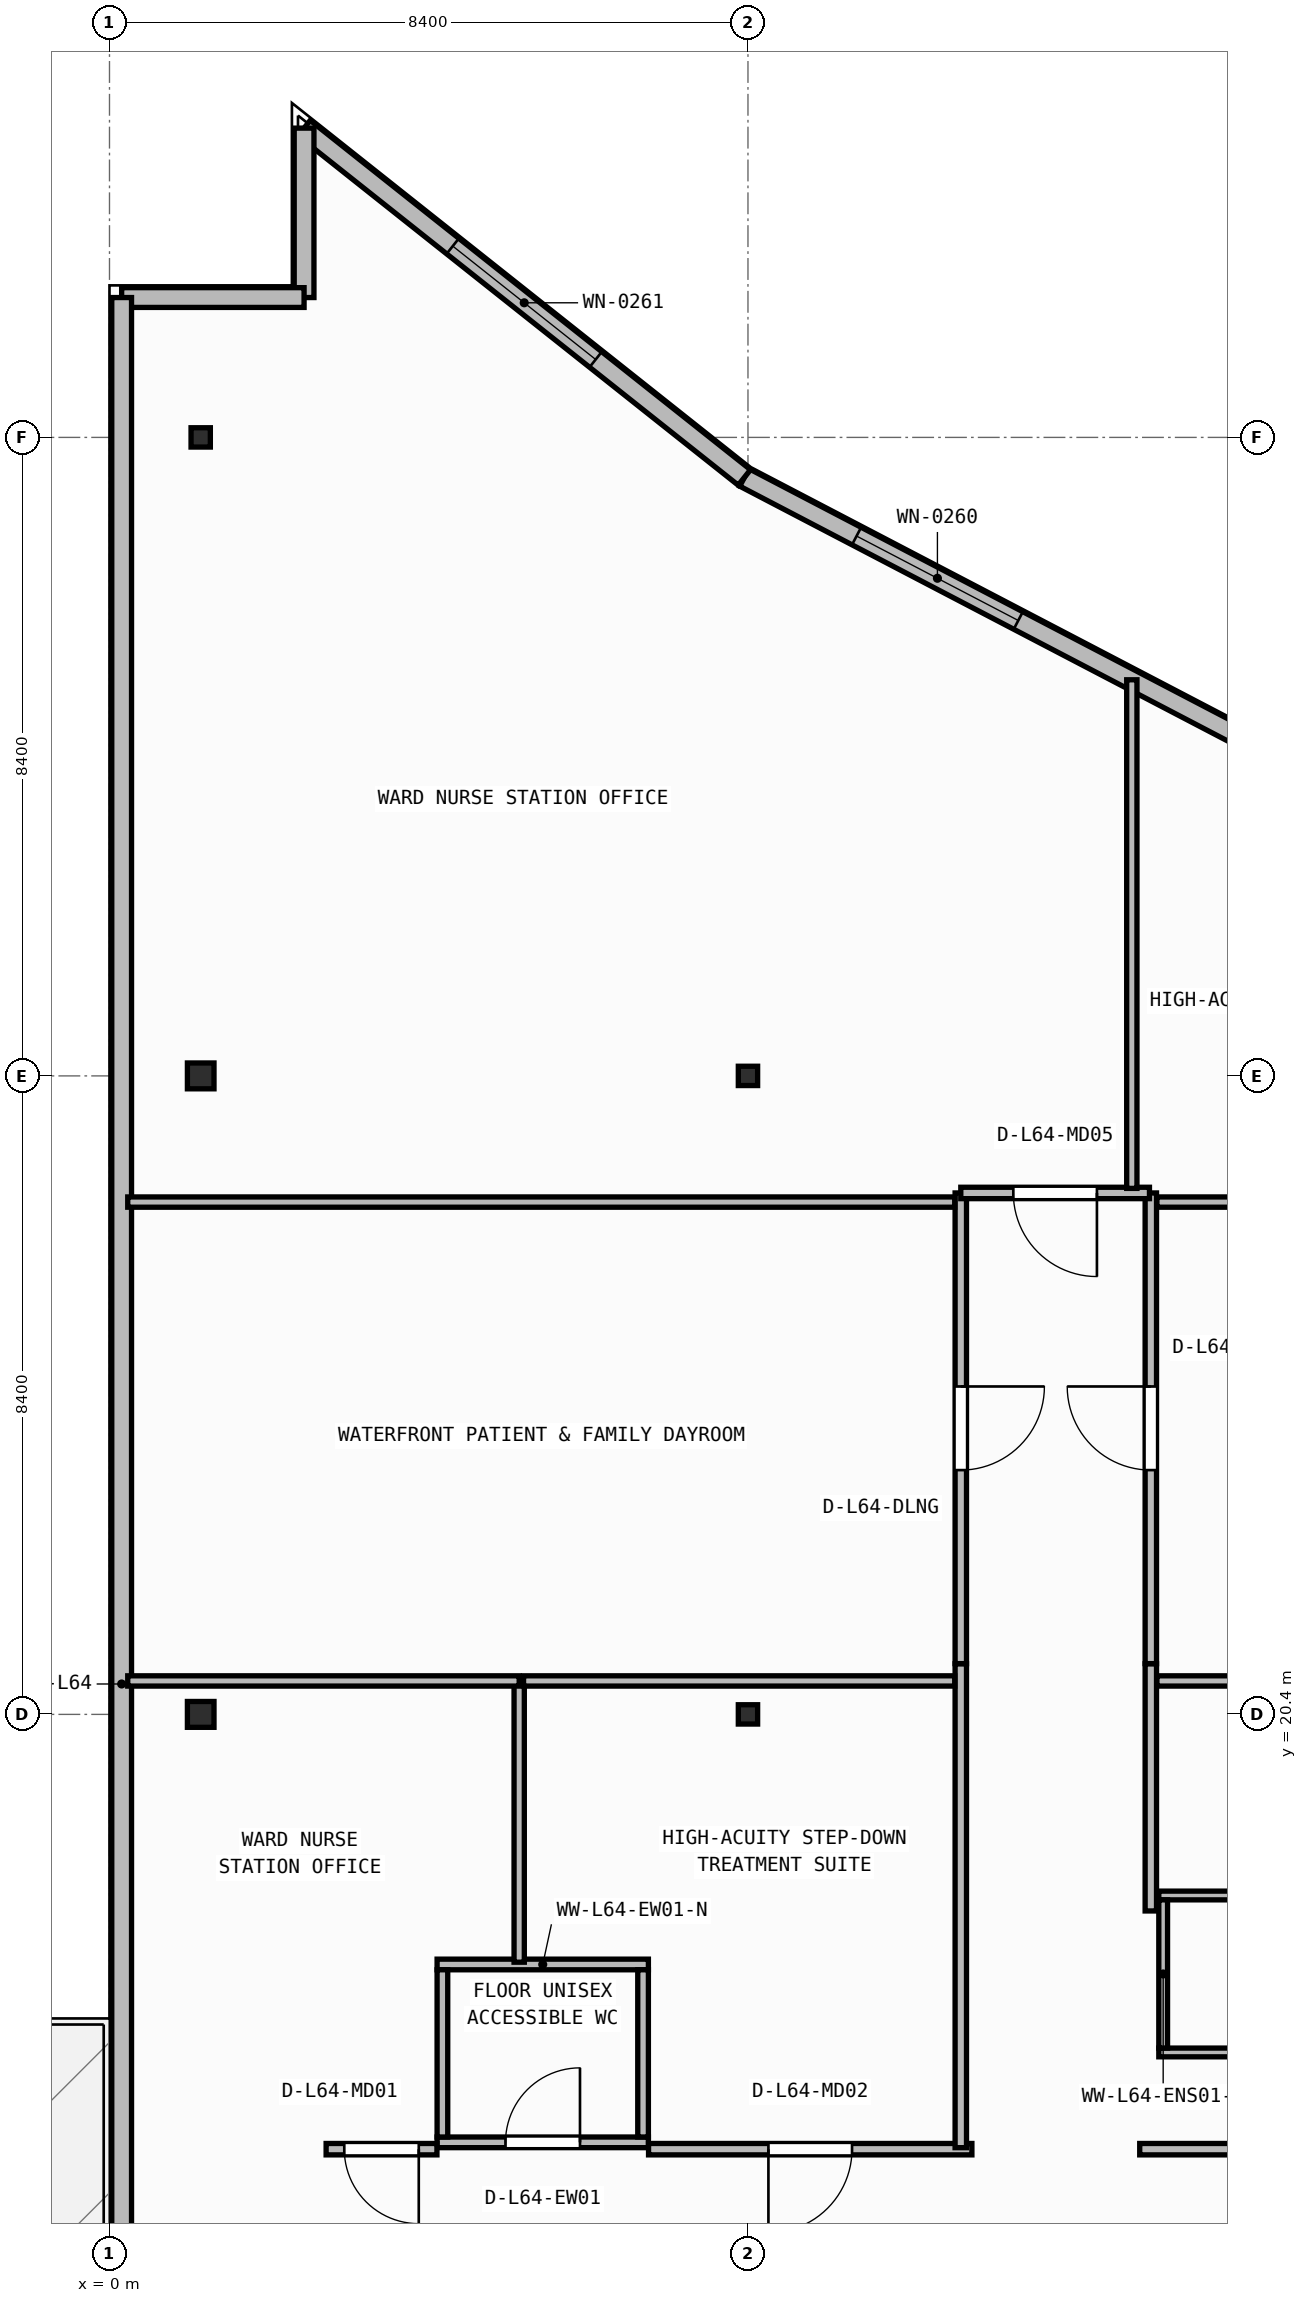
"""IFC4 building model, lengths in metres.
Left out: names, types, materials, properties, quantities, classifications, styles, units other than length and angle.
Written with IfcOpenShell. Run it as: python <this file> out.ifc"""

import sys

from ifc_helpers import new_model, si_unit, direction, frame, frame_2d, origin, origin_2d, place, context, subcontext, project, spatial, rectangle, i_section, extrude, element, fill, save


model = new_model("IFC4")
c1 = context("Model", 3, precision=1e-05, world=origin(), true_north=direction((0.0, 1.0)))
c2 = subcontext(c1, "Body", "Model", "MODEL_VIEW")
j1 = project(units=[si_unit("LENGTHUNIT", "METRE"), si_unit("PLANEANGLEUNIT", "RADIAN")], contexts=[c1])
p1 = place(None, origin())
s1 = spatial("IfcSite", under=j1, at=p1, CompositionType="ELEMENT")
p2 = place(p1, origin())
s2 = spatial("IfcBuilding", under=s1, at=p2, CompositionType="ELEMENT")
p3 = place(p2, frame((0.0, 0.0, 260.5)))
s3 = spatial("IfcBuildingStorey", under=s2, at=p3, CompositionType="ELEMENT", Elevation=260.5)
p4 = place(p3, frame((1.2, 20.4, 0.0), z_axis=(0.0, 0.0, 1.0), x_axis=(1.0, 0.0, 0.0)))
e1 = element("IfcColumn", 1, at=p4, inside=s3, PredefinedType="COLUMN", context=c2, shape_type="SweptSolid", body=[
    extrude(i_section(OverallWidth=0.35, OverallDepth=0.34, WebThickness=0.016, FlangeThickness=0.028, at=origin_2d()), origin(), (0.0, 0.0, 1.0), 3.95),
])
p5 = place(p3, frame((8.4, 20.4, 0.0), z_axis=(0.0, 0.0, 1.0), x_axis=(1.0, 0.0, 0.0)))
e2 = element("IfcColumn", 2, at=p5, inside=s3, PredefinedType="COLUMN", context=c2, shape_type="SweptSolid", body=[
    extrude(i_section(OverallWidth=0.254, OverallDepth=0.254, WebThickness=0.009, FlangeThickness=0.014, FilletRadius=0.013, at=origin_2d()), origin(), (0.0, 0.0, 1.0), 3.95),
])
p6 = place(p3, frame((1.2, 28.8, 0.0), z_axis=(0.0, 0.0, 1.0), x_axis=(1.0, 0.0, 0.0)))
e3 = element("IfcColumn", 3, at=p6, inside=s3, PredefinedType="COLUMN", context=c2, shape_type="SweptSolid", body=[
    extrude(i_section(OverallWidth=0.35, OverallDepth=0.34, WebThickness=0.016, FlangeThickness=0.028, at=origin_2d()), origin(), (0.0, 0.0, 1.0), 3.95),
])
for number, where, z_axis, x_axis in (
    (4, (8.4, 28.8, 0.0), (0.0, 0.0, 1.0), (1.0, 0.0, 0.0)),
    (5, (1.2, 37.2, 0.0), (0.0, 0.0, 1.0), (1.0, 0.0, 0.0)),
):
    element("IfcColumn", number, at=place(p3, frame(where, z_axis=z_axis, x_axis=x_axis)), inside=s3, PredefinedType="COLUMN", context=c2, shape_type="SweptSolid", body=[
        extrude(i_section(OverallWidth=0.254, OverallDepth=0.254, WebThickness=0.009, FlangeThickness=0.014, FilletRadius=0.013, at=origin_2d()), origin(), (0.0, 0.0, 1.0), 3.95),
    ])
p7 = place(p3, frame((17.673, 31.806, 0.0), z_axis=(0.0, 0.0, 1.0), x_axis=(-0.886426635565, 0.462869117311, 0.0)))
e6 = element("IfcWall", 6, at=p7, inside=s3, PredefinedType="STANDARD", context=c2, shape_type="SweptSolid", body=[
    extrude(rectangle(XDim=10.514, YDim=0.26, at=frame_2d((5.257, 0.0))), origin(), (0.0, 0.0, 1.0), 3.71),
])
p8 = place(p7, frame((6.449, 0.0, 0.9)))
e7 = element("IfcOpeningElement", 7, at=p8, cuts=e6, PredefinedType="OPENING", context=c2, shape_type="SweptSolid", body=[
    extrude(rectangle(XDim=2.4, YDim=1.65, at=frame_2d((1.2, 0.825))), frame((0.0, 0.14, 0.0), z_axis=(0.0, -1.0, 0.0), x_axis=(1.0, 0.0, 0.0)), (0.0, 0.0, 1.0), 0.28),
])
p9 = place(p3, frame((8.353, 36.673, 0.0), z_axis=(0.0, 0.0, 1.0), x_axis=(-0.783387911746, 0.621533088203, 0.0)))
e8 = element("IfcWall", 8, at=p9, inside=s3, PredefinedType="STANDARD", context=c2, shape_type="SweptSolid", body=[
    extrude(rectangle(XDim=7.394, YDim=0.26, at=frame_2d((3.697, 0.0))), origin(), (0.0, 0.0, 1.0), 3.71),
])
p10 = place(p9, frame((2.497, 0.0, 0.9)))
e9 = element("IfcOpeningElement", 9, at=p10, cuts=e8, PredefinedType="OPENING", context=c2, shape_type="SweptSolid", body=[
    extrude(rectangle(XDim=2.4, YDim=1.65, at=frame_2d((1.2, 0.825))), frame((0.0, 0.14, 0.0), z_axis=(0.0, -1.0, 0.0), x_axis=(1.0, 0.0, 0.0)), (0.0, 0.0, 1.0), 0.28),
])
p11 = place(p3, frame((2.56, 41.269, 0.0), z_axis=(0.0, 0.0, 1.0), x_axis=(0.0, -1.0, 0.0)))
e10 = element("IfcWall", 10, at=p11, inside=s3, PredefinedType="STANDARD", context=c2, shape_type="SweptSolid", body=[
    extrude(rectangle(XDim=2.229, YDim=0.26, at=frame_2d((1.114, 0.0))), origin(), (0.0, 0.0, 1.0), 3.71),
])
p12 = place(p3, frame((2.56, 39.04, 0.0), z_axis=(0.0, 0.0, 1.0), x_axis=(-1.0, 0.0, 0.0)))
e11 = element("IfcWall", 11, at=p12, inside=s3, PredefinedType="STANDARD", context=c2, shape_type="SweptSolid", body=[
    extrude(rectangle(XDim=2.4, YDim=0.26, at=frame_2d((1.2, 0.0))), origin(), (0.0, 0.0, 1.0), 3.71),
])
p13 = place(p3, frame((0.16, 39.04, 0.0), z_axis=(0.0, 0.0, 1.0), x_axis=(0.0, -1.0, 0.0)))
e12 = element("IfcWall", 12, at=p13, inside=s3, PredefinedType="STANDARD", context=c2, shape_type="SweptSolid", body=[
    extrude(rectangle(XDim=36.48, YDim=0.26, at=frame_2d((18.24, 0.0))), origin(), (0.0, 0.0, 1.0), 3.71),
])
p14 = place(p13, frame((28.737, 0.0, 0.0)))
e13 = element("IfcOpeningElement", 13, at=p14, cuts=e12, PredefinedType="OPENING", context=c2, shape_type="SweptSolid", body=[
    extrude(rectangle(XDim=1.3, YDim=2.15, at=frame_2d((0.65, 1.075))), frame((0.0, 0.14, 0.0), z_axis=(0.0, -1.0, 0.0), x_axis=(1.0, 0.0, 0.0)), (0.0, 0.0, 1.0), 0.28),
])
p15 = place(p3, frame((4.31, 14.77, 0.0), z_axis=(0.0, 0.0, 1.0), x_axis=(1.0, 0.0, 0.0)))
e14 = element("IfcWall", 14, at=p15, inside=s3, PredefinedType="PARTITIONING", context=c2, shape_type="SweptSolid", body=[
    extrude(rectangle(XDim=2.78, YDim=0.14, at=frame_2d((1.39, 0.0))), origin(), (0.0, 0.0, 1.0), 3.71),
])
p16 = place(p15, frame((0.9, 0.0, 0.0)))
e15 = element("IfcOpeningElement", 15, at=p16, cuts=e14, PredefinedType="OPENING", context=c2, shape_type="SweptSolid", body=[
    extrude(rectangle(XDim=0.98, YDim=2.1, at=frame_2d((0.49, 1.05))), frame((0.0, 0.08, 0.0), z_axis=(0.0, -1.0, 0.0), x_axis=(1.0, 0.0, 0.0)), (0.0, 0.0, 1.0), 0.16),
])
p17 = place(p3, frame((4.31, 17.11, 0.0), z_axis=(0.0, 0.0, 1.0), x_axis=(1.0, 0.0, 0.0)))
e16 = element("IfcWall", 16, at=p17, inside=s3, PredefinedType="PARTITIONING", context=c2, shape_type="SweptSolid", body=[
    extrude(rectangle(XDim=2.78, YDim=0.14, at=frame_2d((1.39, 0.0))), origin(), (0.0, 0.0, 1.0), 3.71),
])
for number, where, z_axis, x_axis in (
    (17, (4.38, 14.84, 0.0), (0.0, 0.0, 1.0), (0.0, 1.0, 0.0)),
    (18, (7.02, 14.84, 0.0), (0.0, 0.0, 1.0), (0.0, 1.0, 0.0)),
):
    element("IfcWall", number, at=place(p3, frame(where, z_axis=z_axis, x_axis=x_axis)), inside=s3, PredefinedType="PARTITIONING", context=c2, shape_type="SweptSolid", body=[
        extrude(rectangle(XDim=2.2, YDim=0.14, at=frame_2d((1.1, 0.0))), origin(), (0.0, 0.0, 1.0), 3.71),
    ])
for number, where, z_axis, x_axis in (
    (19, (13.805, 15.952, 0.0), (0.0, 0.0, 1.0), (1.0, 0.0, 0.0)),
    (20, (13.805, 18.018, 0.0), (0.0, 0.0, 1.0), (1.0, 0.0, 0.0)),
):
    element("IfcWall", number, at=place(p3, frame(where, z_axis=z_axis, x_axis=x_axis)), inside=s3, PredefinedType="PARTITIONING", context=c2, shape_type="SweptSolid", body=[
        extrude(rectangle(XDim=2.15, YDim=0.115, at=frame_2d((1.075, 0.0))), origin(), (0.0, 0.0, 1.0), 3.71),
    ])
p18 = place(p3, frame((13.863, 16.01, 0.0), z_axis=(0.0, 0.0, 1.0), x_axis=(0.0, 1.0, 0.0)))
e21 = element("IfcWall", 21, at=p18, inside=s3, PredefinedType="PARTITIONING", context=c2, shape_type="SweptSolid", body=[
    extrude(rectangle(XDim=1.95, YDim=0.115, at=frame_2d((0.975, 0.0))), origin(), (0.0, 0.0, 1.0), 3.71),
])
p19 = place(p3, frame((4.308, 14.68, 0.0), z_axis=(0.0, 0.0, 1.0), x_axis=(-1.0, 0.0, 0.0)))
e22 = element("IfcWall", 22, at=p19, inside=s3, PredefinedType="PARTITIONING", context=c2, shape_type="SweptSolid", body=[
    extrude(rectangle(XDim=1.458, YDim=0.15, at=frame_2d((0.729, 0.0))), origin(), (0.0, 0.0, 1.0), 3.71),
])
p20 = place(p19, frame((0.239, 0.0, 0.0)))
e23 = element("IfcOpeningElement", 23, at=p20, cuts=e22, PredefinedType="OPENING", context=c2, shape_type="SweptSolid", body=[
    extrude(rectangle(XDim=0.98, YDim=2.1, at=frame_2d((0.49, 1.05))), frame((0.0, 0.085, 0.0), z_axis=(0.0, -1.0, 0.0), x_axis=(1.0, 0.0, 0.0)), (0.0, 0.0, 1.0), 0.17),
])
p21 = place(p3, frame((11.346, 14.68, 0.0), z_axis=(0.0, 0.0, 1.0), x_axis=(-1.0, 0.0, 0.0)))
e24 = element("IfcWall", 24, at=p21, inside=s3, PredefinedType="PARTITIONING", context=c2, shape_type="SweptSolid", body=[
    extrude(rectangle(XDim=4.254, YDim=0.15, at=frame_2d((2.127, 0.0))), origin(), (0.0, 0.0, 1.0), 3.71),
])
p22 = place(p21, frame((1.577, 0.0, 0.0)))
e25 = element("IfcOpeningElement", 25, at=p22, cuts=e24, PredefinedType="OPENING", context=c2, shape_type="SweptSolid", body=[
    extrude(rectangle(XDim=1.1, YDim=2.1, at=frame_2d((0.55, 1.05))), frame((0.0, 0.085, 0.0), z_axis=(0.0, -1.0, 0.0), x_axis=(1.0, 0.0, 0.0)), (0.0, 0.0, 1.0), 0.17),
])
p23 = place(p3, frame((19.016, 14.68, 0.0), z_axis=(0.0, 0.0, 1.0), x_axis=(-1.0, 0.0, 0.0)))
e26 = element("IfcWall", 26, at=p23, inside=s3, PredefinedType="PARTITIONING", context=c2, shape_type="SweptSolid", body=[
    extrude(rectangle(XDim=5.462, YDim=0.15, at=frame_2d((2.731, 0.0))), origin(), (0.0, 0.0, 1.0), 3.71),
])
p24 = place(p23, frame((2.081, 0.0, 0.0)))
e27 = element("IfcOpeningElement", 27, at=p24, cuts=e26, PredefinedType="OPENING", context=c2, shape_type="SweptSolid", body=[
    extrude(rectangle(XDim=1.3, YDim=2.15, at=frame_2d((0.65, 1.075))), frame((0.0, 0.085, 0.0), z_axis=(0.0, -1.0, 0.0), x_axis=(1.0, 0.0, 0.0)), (0.0, 0.0, 1.0), 0.17),
])
p25 = place(p3, frame((11.2, 21.066, 0.0), z_axis=(0.0, 0.0, 1.0), x_axis=(0.0, -1.0, 0.0)))
e28 = element("IfcWall", 28, at=p25, inside=s3, PredefinedType="PARTITIONING", context=c2, shape_type="SweptSolid", body=[
    extrude(rectangle(XDim=6.366, YDim=0.15, at=frame_2d((3.183, 0.0))), origin(), (0.0, 0.0, 1.0), 3.71),
])
p26 = place(p3, frame((13.7, 17.814, 0.0), z_axis=(0.0, 0.0, 1.0), x_axis=(0.0, 1.0, 0.0)))
e29 = element("IfcWall", 29, at=p26, inside=s3, PredefinedType="PARTITIONING", context=c2, shape_type="SweptSolid", body=[
    extrude(rectangle(XDim=3.252, YDim=0.15, at=frame_2d((1.626, 0.0))), origin(), (0.0, 0.0, 1.0), 3.71),
])
p27 = place(p3, frame((11.2, 27.26, 0.0), z_axis=(0.0, 0.0, 1.0), x_axis=(0.0, -1.0, 0.0)))
e30 = element("IfcWall", 30, at=p27, inside=s3, PredefinedType="PARTITIONING", context=c2, shape_type="SweptSolid", body=[
    extrude(rectangle(XDim=6.192, YDim=0.15, at=frame_2d((3.096, 0.0))), origin(), (0.0, 0.0, 1.0), 3.71),
])
p28 = place(p27, frame((2.546, 0.0, 0.0)))
e31 = element("IfcOpeningElement", 31, at=p28, cuts=e30, PredefinedType="OPENING", context=c2, shape_type="SweptSolid", body=[
    extrude(rectangle(XDim=1.1, YDim=2.1, at=frame_2d((0.55, 1.05))), frame((0.0, 0.085, 0.0), z_axis=(0.0, -1.0, 0.0), x_axis=(1.0, 0.0, 0.0)), (0.0, 0.0, 1.0), 0.17),
])
p29 = place(p3, frame((13.7, 21.068, 0.0), z_axis=(0.0, 0.0, 1.0), x_axis=(0.0, 1.0, 0.0)))
e32 = element("IfcWall", 32, at=p29, inside=s3, PredefinedType="PARTITIONING", context=c2, shape_type="SweptSolid", body=[
    extrude(rectangle(XDim=6.192, YDim=0.15, at=frame_2d((3.096, 0.0))), origin(), (0.0, 0.0, 1.0), 3.71),
])
p30 = place(p29, frame((2.546, 0.0, 0.0)))
e33 = element("IfcOpeningElement", 33, at=p30, cuts=e32, PredefinedType="OPENING", context=c2, shape_type="SweptSolid", body=[
    extrude(rectangle(XDim=1.1, YDim=2.1, at=frame_2d((0.55, 1.05))), frame((0.0, 0.085, 0.0), z_axis=(0.0, -1.0, 0.0), x_axis=(1.0, 0.0, 0.0)), (0.0, 0.0, 1.0), 0.17),
])
p31 = place(p3, frame((13.682, 27.26, 0.0), z_axis=(0.0, 0.0, 1.0), x_axis=(-1.0, 0.0, 0.0)))
e34 = element("IfcWall", 34, at=p31, inside=s3, PredefinedType="PARTITIONING", context=c2, shape_type="SweptSolid", body=[
    extrude(rectangle(XDim=2.482, YDim=0.15, at=frame_2d((1.241, 0.0))), origin(), (0.0, 0.0, 1.0), 3.71),
])
p32 = place(p31, frame((0.691, 0.0, 0.0)))
e35 = element("IfcOpeningElement", 35, at=p32, cuts=e34, PredefinedType="OPENING", context=c2, shape_type="SweptSolid", body=[
    extrude(rectangle(XDim=1.1, YDim=2.1, at=frame_2d((0.55, 1.05))), frame((0.0, 0.085, 0.0), z_axis=(0.0, -1.0, 0.0), x_axis=(1.0, 0.0, 0.0)), (0.0, 0.0, 1.0), 0.17),
])
p33 = place(p3, frame((5.39, 17.14, 0.0), z_axis=(0.0, 0.0, 1.0), x_axis=(0.0, 1.0, 0.0)))
e36 = element("IfcWall", 36, at=p33, inside=s3, PredefinedType="PARTITIONING", context=c2, shape_type="SweptSolid", body=[
    extrude(rectangle(XDim=3.7, YDim=0.135, at=frame_2d((1.85, 0.0))), origin(), (0.0, 0.0, 1.0), 3.71),
])
p34 = place(p3, frame((5.39, 20.84, 0.0), z_axis=(0.0, 0.0, 1.0), x_axis=(-1.0, 0.0, 0.0)))
e37 = element("IfcWall", 37, at=p34, inside=s3, PredefinedType="PARTITIONING", context=c2, shape_type="SweptSolid", body=[
    extrude(rectangle(XDim=5.15, YDim=0.135, at=frame_2d((2.575, 0.0))), origin(), (0.0, 0.0, 1.0), 3.157),
])
p35 = place(p3, frame((11.12, 20.84, 0.0), z_axis=(0.0, 0.0, 1.0), x_axis=(-1.0, 0.0, 0.0)))
e38 = element("IfcWall", 38, at=p35, inside=s3, PredefinedType="PARTITIONING", context=c2, shape_type="SweptSolid", body=[
    extrude(rectangle(XDim=5.673, YDim=0.135, at=frame_2d((2.836, 0.0))), origin(), (0.0, 0.0, 1.0), 3.157),
])
p36 = place(p3, frame((18.79, 20.84, 0.0), z_axis=(0.0, 0.0, 1.0), x_axis=(-1.0, 0.0, 0.0)))
e39 = element("IfcWall", 39, at=p36, inside=s3, PredefinedType="PARTITIONING", context=c2, shape_type="SweptSolid", body=[
    extrude(rectangle(XDim=5.01, YDim=0.135, at=frame_2d((2.505, 0.0))), origin(), (0.0, 0.0, 1.0), 3.157),
])
p37 = place(p3, frame((11.12, 27.14, 0.0), z_axis=(0.0, 0.0, 1.0), x_axis=(-1.0, 0.0, 0.0)))
e40 = element("IfcWall", 40, at=p37, inside=s3, PredefinedType="PARTITIONING", context=c2, shape_type="SweptSolid", body=[
    extrude(rectangle(XDim=10.88, YDim=0.135, at=frame_2d((5.44, 0.0))), origin(), (0.0, 0.0, 1.0), 3.71),
])
p38 = place(p3, frame((30.76, 27.14, 0.0), z_axis=(0.0, 0.0, 1.0), x_axis=(-1.0, 0.0, 0.0)))
e41 = element("IfcWall", 41, at=p38, inside=s3, PredefinedType="PARTITIONING", context=c2, shape_type="SweptSolid", body=[
    extrude(rectangle(XDim=16.98, YDim=0.135, at=frame_2d((8.49, 0.0))), origin(), (0.0, 0.0, 1.0), 3.71),
])
p39 = place(p38, frame((0.587, 0.0, 0.0)))
e42 = element("IfcOpeningElement", 42, at=p39, cuts=e41, PredefinedType="OPENING", context=c2, shape_type="SweptSolid", body=[
    extrude(rectangle(XDim=1.1, YDim=2.1, at=frame_2d((0.55, 1.05))), frame((0.0, 0.077, 0.0), z_axis=(0.0, -1.0, 0.0), x_axis=(1.0, 0.0, 0.0)), (0.0, 0.0, 1.0), 0.155),
])
p40 = place(p3, frame((13.45, 27.32, 0.0), z_axis=(0.0, 0.0, 1.0), x_axis=(0.0, 1.0, 0.0)))
e43 = element("IfcWall", 43, at=p40, inside=s3, PredefinedType="PARTITIONING", context=c2, shape_type="SweptSolid", body=[
    extrude(rectangle(XDim=6.691, YDim=0.135, at=frame_2d((3.346, 0.0))), origin(), (0.0, 0.0, 1.0), 3.71),
])
p41 = place(p8, origin())
e44 = element("IfcWindow", 44, at=p41, inside=s3, PartitioningType="SINGLE_PANEL", PredefinedType="WINDOW", context=c2, shape_type="SweptSolid", body=[
    extrude(rectangle(XDim=2.4, YDim=1.65, at=frame_2d((1.2, 0.825))), frame((0.0, 0.03, 0.0), z_axis=(0.0, -1.0, 0.0), x_axis=(1.0, 0.0, 0.0)), (0.0, 0.0, 1.0), 0.06),
])
fill(e7, e44)
p42 = place(p10, origin())
e45 = element("IfcWindow", 45, at=p42, inside=s3, PartitioningType="SINGLE_PANEL", PredefinedType="WINDOW", context=c2, shape_type="SweptSolid", body=[
    extrude(rectangle(XDim=2.4, YDim=1.65, at=frame_2d((1.2, 0.825))), frame((0.0, 0.03, 0.0), z_axis=(0.0, -1.0, 0.0), x_axis=(1.0, 0.0, 0.0)), (0.0, 0.0, 1.0), 0.06),
])
fill(e9, e45)
p43 = place(p16, origin())
e46 = element("IfcDoor", 46, at=p43, inside=s3, OperationType="SINGLE_SWING_RIGHT", PredefinedType="DOOR", context=c2, shape_type="SweptSolid", body=[
    extrude(rectangle(XDim=0.98, YDim=2.1, at=frame_2d((0.49, 1.05))), frame((0.0, 0.025, 0.0), z_axis=(0.0, -1.0, 0.0), x_axis=(1.0, 0.0, 0.0)), (0.0, 0.0, 1.0), 0.05),
])
fill(e15, e46)
p44 = place(p20, origin())
e47 = element("IfcDoor", 47, at=p44, inside=s3, OperationType="SINGLE_SWING_LEFT", PredefinedType="DOOR", context=c2, shape_type="SweptSolid", body=[
    extrude(rectangle(XDim=0.98, YDim=2.1, at=frame_2d((0.49, 1.05))), frame((0.0, 0.025, 0.0), z_axis=(0.0, -1.0, 0.0), x_axis=(1.0, 0.0, 0.0)), (0.0, 0.0, 1.0), 0.05),
])
fill(e23, e47)
p45 = place(p22, origin())
e48 = element("IfcDoor", 48, at=p45, inside=s3, OperationType="SINGLE_SWING_RIGHT", PredefinedType="DOOR", context=c2, shape_type="SweptSolid", body=[
    extrude(rectangle(XDim=1.1, YDim=2.1, at=frame_2d((0.55, 1.05))), frame((0.0, 0.025, 0.0), z_axis=(0.0, -1.0, 0.0), x_axis=(1.0, 0.0, 0.0)), (0.0, 0.0, 1.0), 0.05),
])
fill(e25, e48)
p46 = place(p28, origin())
e49 = element("IfcDoor", 49, at=p46, inside=s3, OperationType="SINGLE_SWING_LEFT", PredefinedType="DOOR", context=c2, shape_type="SweptSolid", body=[
    extrude(rectangle(XDim=1.1, YDim=2.1, at=frame_2d((0.55, 1.05))), frame((0.0, 0.025, 0.0), z_axis=(0.0, -1.0, 0.0), x_axis=(1.0, 0.0, 0.0)), (0.0, 0.0, 1.0), 0.05),
])
fill(e31, e49)
p47 = place(p30, origin())
e50 = element("IfcDoor", 50, at=p47, inside=s3, OperationType="SINGLE_SWING_RIGHT", PredefinedType="DOOR", context=c2, shape_type="SweptSolid", body=[
    extrude(rectangle(XDim=1.1, YDim=2.1, at=frame_2d((0.55, 1.05))), frame((0.0, 0.025, 0.0), z_axis=(0.0, -1.0, 0.0), x_axis=(1.0, 0.0, 0.0)), (0.0, 0.0, 1.0), 0.05),
])
fill(e33, e50)
p48 = place(p32, origin())
e51 = element("IfcDoor", 51, at=p48, inside=s3, OperationType="SINGLE_SWING_LEFT", PredefinedType="DOOR", context=c2, shape_type="SweptSolid", body=[
    extrude(rectangle(XDim=1.1, YDim=2.1, at=frame_2d((0.55, 1.05))), frame((0.0, 0.025, 0.0), z_axis=(0.0, -1.0, 0.0), x_axis=(1.0, 0.0, 0.0)), (0.0, 0.0, 1.0), 0.05),
])
fill(e35, e51)
save(model, sys.argv[1])
